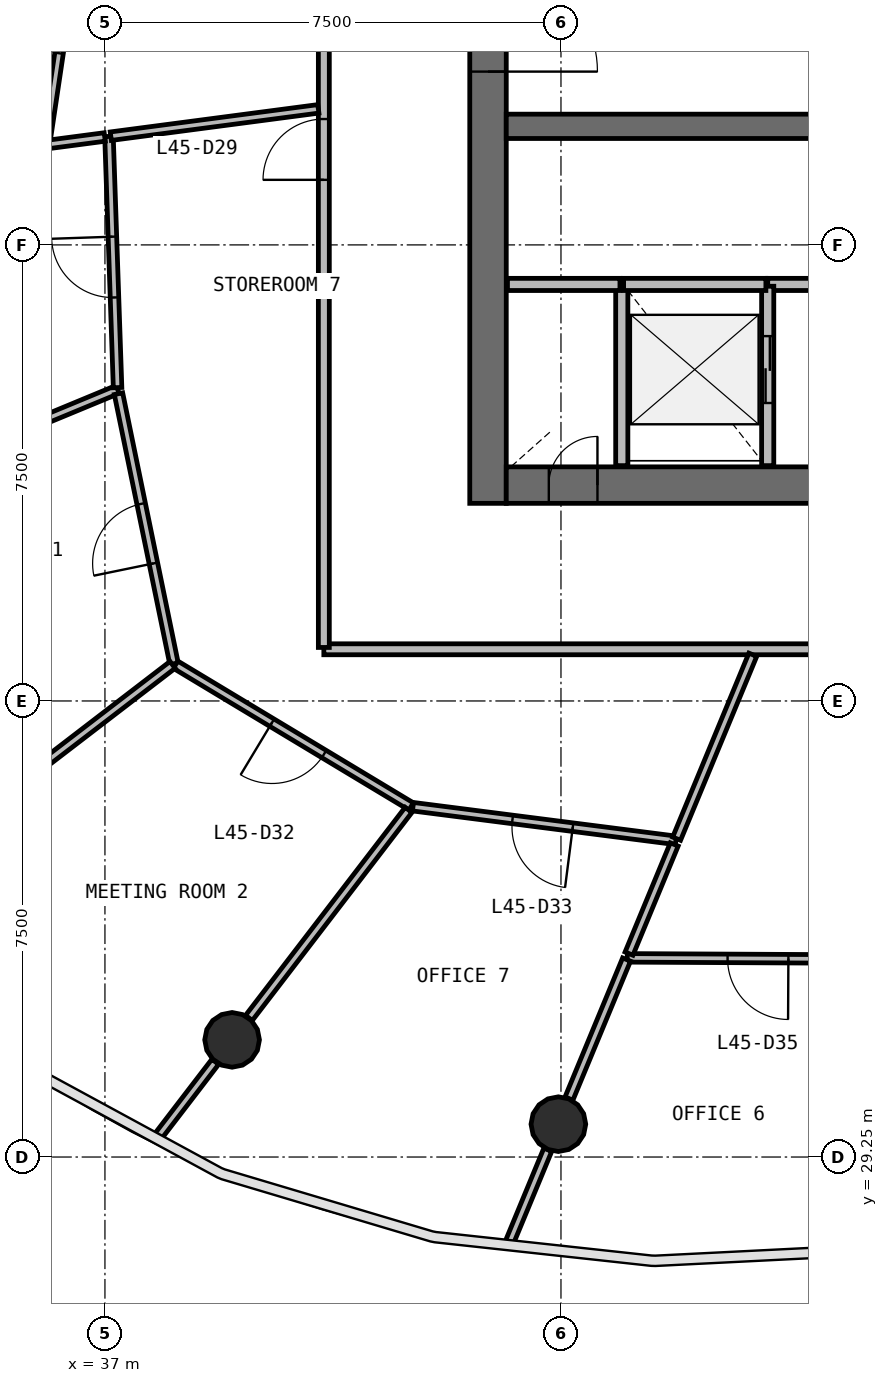
"""IFC4 building model, lengths in metres.
Left out: names, types, materials, properties, quantities, classifications, styles, units other than length and angle.
Written with IfcOpenShell. Run it as: python <this file> out.ifc"""

import sys

from ifc_helpers import new_model, si_unit, direction, frame, frame_2d, origin, origin_2d, place, context, subcontext, project, spatial, rectangle, circle, extrude, source, transform, mapped, element, fill, save


model = new_model("IFC4")
c1 = context("Model", 3, precision=1e-05, world=origin(), true_north=direction((0.0, 1.0)))
c2 = subcontext(c1, "Body", "Model", "MODEL_VIEW")
j1 = project(units=[si_unit("LENGTHUNIT", "METRE"), si_unit("PLANEANGLEUNIT", "RADIAN")], contexts=[c1])
p1 = place(None, origin())
s1 = spatial("IfcSite", under=j1, at=p1, CompositionType="ELEMENT")
p2 = place(p1, origin())
s2 = spatial("IfcBuilding", under=s1, at=p2, CompositionType="ELEMENT")
p3 = place(p2, frame((0.0, 0.0, 187.7)))
s3 = spatial("IfcBuildingStorey", under=s2, at=p3, CompositionType="ELEMENT", Elevation=187.7)
p4 = place(p3, frame((43.3, 56.0, 0.0), z_axis=(0.0, 0.0, 1.0), x_axis=(0.0, -1.0, 0.0)))
e1 = element("IfcWall", 1, at=p4, inside=s3, PredefinedType="SHEAR", context=c2, shape_type="SweptSolid", body=[
    extrude(rectangle(XDim=16.0, YDim=0.6, at=frame_2d((8.0, 0.0))), origin(), (0.0, 0.0, 1.0), 3.9),
])
p5 = place(p4, frame((7.1, 0.0, 0.0)))
e2 = element("IfcOpeningElement", 2, at=p5, cuts=e1, PredefinedType="OPENING", context=c2, shape_type="SweptSolid", body=[
    extrude(rectangle(XDim=1.8, YDim=2.1, at=frame_2d((0.9, 1.05))), frame((0.0, 0.31, 0.0), z_axis=(0.0, -1.0, 0.0), x_axis=(1.0, 0.0, 0.0)), (0.0, 0.0, 1.0), 0.62),
])
p6 = place(p3, frame((43.6, 40.3, 0.0), z_axis=(0.0, 0.0, 1.0), x_axis=(1.0, 0.0, 0.0)))
e3 = element("IfcWall", 3, at=p6, inside=s3, PredefinedType="SHEAR", context=c2, shape_type="SweptSolid", body=[
    extrude(rectangle(XDim=16.8, YDim=0.6, at=frame_2d((8.4, 0.0))), origin(), (0.0, 0.0, 1.0), 3.9),
])
p7 = place(p6, frame((10.3, 0.0, 0.0)))
e4 = element("IfcOpeningElement", 4, at=p7, cuts=e3, PredefinedType="OPENING", context=c2, shape_type="SweptSolid", body=[
    extrude(rectangle(XDim=1.2, YDim=2.1, at=frame_2d((0.6, 1.05))), frame((0.0, 0.31, 0.0), z_axis=(0.0, -1.0, 0.0), x_axis=(1.0, 0.0, 0.0)), (0.0, 0.0, 1.0), 0.62),
])
p8 = place(p6, frame((7.25, 0.0, 0.0)))
e5 = element("IfcOpeningElement", 5, at=p8, cuts=e3, PredefinedType="OPENING", context=c2, shape_type="SweptSolid", body=[
    extrude(rectangle(XDim=1.1, YDim=2.1, at=frame_2d((0.55, 1.05))), frame((0.0, 0.31, 0.0), z_axis=(0.0, -1.0, 0.0), x_axis=(1.0, 0.0, 0.0)), (0.0, 0.0, 1.0), 0.62),
])
p9 = place(p6, frame((0.7, 0.0, 0.0)))
e6 = element("IfcOpeningElement", 6, at=p9, cuts=e3, PredefinedType="OPENING", context=c2, shape_type="SweptSolid", body=[
    extrude(rectangle(XDim=0.8, YDim=2.1, at=frame_2d((0.4, 1.05))), frame((0.0, 0.31, 0.0), z_axis=(0.0, -1.0, 0.0), x_axis=(1.0, 0.0, 0.0)), (0.0, 0.0, 1.0), 0.62),
])
p10 = place(p3, frame((43.6, 46.2, 0.0), z_axis=(0.0, 0.0, 1.0), x_axis=(1.0, 0.0, 0.0)))
e7 = element("IfcWall", 7, at=p10, inside=s3, PredefinedType="SHEAR", context=c2, shape_type="SweptSolid", body=[
    extrude(rectangle(XDim=16.8, YDim=0.4, at=frame_2d((8.4, 0.0))), origin(), (0.0, 0.0, 1.0), 3.9),
])
p11 = place(p10, frame((9.8, 0.0, 0.0)))
e8 = element("IfcOpeningElement", 8, at=p11, cuts=e7, PredefinedType="OPENING", context=c2, shape_type="SweptSolid", body=[
    extrude(rectangle(XDim=1.1, YDim=2.1, at=frame_2d((0.55, 1.05))), frame((0.0, 0.21, 0.0), z_axis=(0.0, -1.0, 0.0), x_axis=(1.0, 0.0, 0.0)), (0.0, 0.0, 1.0), 0.42),
])
p12 = place(p10, frame((12.3, 0.0, 0.0)))
e9 = element("IfcOpeningElement", 9, at=p12, cuts=e7, PredefinedType="OPENING", context=c2, shape_type="SweptSolid", body=[
    extrude(rectangle(XDim=1.1, YDim=2.1, at=frame_2d((0.55, 1.05))), frame((0.0, 0.21, 0.0), z_axis=(0.0, -1.0, 0.0), x_axis=(1.0, 0.0, 0.0)), (0.0, 0.0, 1.0), 0.42),
])
p13 = place(p10, frame((14.8, 0.0, 0.0)))
e10 = element("IfcOpeningElement", 10, at=p13, cuts=e7, PredefinedType="OPENING", context=c2, shape_type="SweptSolid", body=[
    extrude(rectangle(XDim=1.1, YDim=2.1, at=frame_2d((0.55, 1.05))), frame((0.0, 0.21, 0.0), z_axis=(0.0, -1.0, 0.0), x_axis=(1.0, 0.0, 0.0)), (0.0, 0.0, 1.0), 0.42),
])
p14 = place(p10, frame((7.85, 0.0, 0.0)))
e11 = element("IfcOpeningElement", 11, at=p14, cuts=e7, PredefinedType="OPENING", context=c2, shape_type="SweptSolid", body=[
    extrude(rectangle(XDim=0.9, YDim=2.1, at=frame_2d((0.45, 1.05))), frame((0.0, 0.21, 0.0), z_axis=(0.0, -1.0, 0.0), x_axis=(1.0, 0.0, 0.0)), (0.0, 0.0, 1.0), 0.42),
])
m1 = source(origin(), c2, "Body", "SweptSolid", [
    extrude(circle(Radius=0.45, at=origin_2d()), origin(), (0.0, 0.0, 1.0), 3.9),
])
for number, where, z_axis, x_axis in (
    (12, (39.091, 31.177, 0.0), (0.0, 0.0, 1.0), (1.0, 0.0, 0.0)),
    (13, (44.457, 29.79, 0.0), (0.0, 0.0, 1.0), (1.0, 0.0, 0.0)),
):
    element("IfcColumn", number, at=place(p3, frame(where, z_axis=z_axis, x_axis=x_axis)), inside=s3, PredefinedType="COLUMN", context=c2, shape_type="MappedRepresentation", body=[
        mapped(m1, transform((0.0, 0.0, 0.0), scale=1.0)),
    ])
p15 = place(p3, frame((52.7, 43.6, 0.0), z_axis=(0.0, 0.0, 1.0), x_axis=(-1.0, 0.0, 0.0)))
e14 = element("IfcWall", 14, at=p15, inside=s3, PredefinedType="SOLIDWALL", context=c2, shape_type="SweptSolid", body=[
    extrude(rectangle(XDim=4.8, YDim=0.2, at=frame_2d((2.4, 0.0))), origin(), (0.0, 0.0, 1.0), 3.58),
])
p16 = place(p3, frame((45.5, 43.6, 0.0), z_axis=(0.0, 0.0, 1.0), x_axis=(0.0, -1.0, 0.0)))
e15 = element("IfcWall", 15, at=p16, inside=s3, PredefinedType="SOLIDWALL", context=c2, shape_type="SweptSolid", body=[
    extrude(rectangle(XDim=2.98, YDim=0.2, at=frame_2d((1.49, 0.0))), origin(), (0.0, 0.0, 1.0), 3.58),
])
p17 = place(p3, frame((47.9, 40.62, 0.0), z_axis=(0.0, 0.0, 1.0), x_axis=(0.0, 1.0, 0.0)))
e16 = element("IfcWall", 16, at=p17, inside=s3, PredefinedType="SOLIDWALL", context=c2, shape_type="SweptSolid", body=[
    extrude(rectangle(XDim=2.95, YDim=0.2, at=frame_2d((1.475, 0.0))), origin(), (0.0, 0.0, 1.0), 3.58),
])
p18 = place(p17, frame((1.03, 0.0, 0.0)))
e17 = element("IfcOpeningElement", 17, at=p18, cuts=e16, PredefinedType="OPENING", context=c2, shape_type="SweptSolid", body=[
    extrude(rectangle(XDim=1.1, YDim=2.1, at=frame_2d((0.55, 1.05))), frame((0.0, 0.11, 0.0), z_axis=(0.0, -1.0, 0.0), x_axis=(1.0, 0.0, 0.0)), (0.0, 0.0, 1.0), 0.22),
])
p19 = place(p3, frame((47.87, 43.6, 0.0), z_axis=(0.0, 0.0, 1.0), x_axis=(-1.0, 0.0, 0.0)))
e18 = element("IfcWall", 18, at=p19, inside=s3, PredefinedType="SOLIDWALL", context=c2, shape_type="SweptSolid", body=[
    extrude(rectangle(XDim=2.34, YDim=0.2, at=frame_2d((1.17, 0.0))), origin(), (0.0, 0.0, 1.0), 3.58),
])
p20 = place(p3, frame((45.47, 43.6, 0.0), z_axis=(0.0, 0.0, 1.0), x_axis=(-1.0, 0.0, 0.0)))
e19 = element("IfcWall", 19, at=p20, inside=s3, PredefinedType="SOLIDWALL", context=c2, shape_type="SweptSolid", body=[
    extrude(rectangle(XDim=1.85, YDim=0.2, at=frame_2d((0.925, 0.0))), origin(), (0.0, 0.0, 1.0), 3.58),
])
p21 = place(p3, frame((63.4, 37.6, 0.0), z_axis=(0.0, 0.0, 1.0), x_axis=(-1.0, 0.0, 0.0)))
e20 = element("IfcWall", 20, at=p21, inside=s3, PredefinedType="PARTITIONING", context=c2, shape_type="SweptSolid", body=[
    extrude(rectangle(XDim=22.8, YDim=0.18, at=frame_2d((11.4, 0.0))), origin(), (0.0, 0.0, 1.0), 2.88),
])
p22 = place(p21, frame((10.95, 0.0, 0.0)))
e21 = element("IfcOpeningElement", 21, at=p22, cuts=e20, PredefinedType="OPENING", context=c2, shape_type="SweptSolid", body=[
    extrude(rectangle(XDim=1.0, YDim=2.1, at=frame_2d((0.5, 1.05))), frame((0.0, 0.1, 0.0), z_axis=(0.0, -1.0, 0.0), x_axis=(1.0, 0.0, 0.0)), (0.0, 0.0, 1.0), 0.2),
])
p23 = place(p21, frame((8.75, 0.0, 0.0)))
e22 = element("IfcOpeningElement", 22, at=p23, cuts=e20, PredefinedType="OPENING", context=c2, shape_type="SweptSolid", body=[
    extrude(rectangle(XDim=1.0, YDim=2.1, at=frame_2d((0.5, 1.05))), frame((0.0, 0.1, 0.0), z_axis=(0.0, -1.0, 0.0), x_axis=(1.0, 0.0, 0.0)), (0.0, 0.0, 1.0), 0.2),
])
p24 = place(p21, frame((1.95, 0.0, 0.0)))
e23 = element("IfcOpeningElement", 23, at=p24, cuts=e20, PredefinedType="OPENING", context=c2, shape_type="SweptSolid", body=[
    extrude(rectangle(XDim=1.0, YDim=2.1, at=frame_2d((0.5, 1.05))), frame((0.0, 0.1, 0.0), z_axis=(0.0, -1.0, 0.0), x_axis=(1.0, 0.0, 0.0)), (0.0, 0.0, 1.0), 0.2),
])
p25 = place(p3, frame((40.6, 37.63, 0.0), z_axis=(0.0, 0.0, 1.0), x_axis=(0.0, 1.0, 0.0)))
e24 = element("IfcWall", 24, at=p25, inside=s3, PredefinedType="PARTITIONING", context=c2, shape_type="SweptSolid", body=[
    extrude(rectangle(XDim=20.74, YDim=0.18, at=frame_2d((10.37, 0.0))), origin(), (0.0, 0.0, 1.0), 2.88),
])
p26 = place(p25, frame((9.89, 0.0, 0.0)))
e25 = element("IfcOpeningElement", 25, at=p26, cuts=e24, PredefinedType="OPENING", context=c2, shape_type="SweptSolid", body=[
    extrude(rectangle(XDim=1.0, YDim=2.1, at=frame_2d((0.5, 1.05))), frame((0.0, 0.1, 0.0), z_axis=(0.0, -1.0, 0.0), x_axis=(1.0, 0.0, 0.0)), (0.0, 0.0, 1.0), 0.2),
])
p27 = place(p25, frame((7.69, 0.0, 0.0)))
e26 = element("IfcOpeningElement", 26, at=p27, cuts=e24, PredefinedType="OPENING", context=c2, shape_type="SweptSolid", body=[
    extrude(rectangle(XDim=1.0, YDim=2.1, at=frame_2d((0.5, 1.05))), frame((0.0, 0.1, 0.0), z_axis=(0.0, -1.0, 0.0), x_axis=(1.0, 0.0, 0.0)), (0.0, 0.0, 1.0), 0.2),
])
p28 = place(p3, frame((37.209, 41.873, 0.0), z_axis=(0.0, 0.0, 1.0), x_axis=(-0.923876934089, -0.38268970545, 0.0)))
e27 = element("IfcWall", 27, at=p28, inside=s3, PredefinedType="PARTITIONING", context=c2, shape_type="SweptSolid", body=[
    extrude(rectangle(XDim=5.998, YDim=0.14, at=frame_2d((2.999, 0.0))), origin(), (0.0, 0.0, 1.0), 2.88),
])
p29 = place(p3, frame((38.136, 37.362, 0.0), z_axis=(0.0, 0.0, 1.0), x_axis=(-0.201373374917, 0.979514555213, 0.0)))
e28 = element("IfcWall", 28, at=p29, inside=s3, PredefinedType="PARTITIONING", context=c2, shape_type="SweptSolid", body=[
    extrude(rectangle(XDim=4.534, YDim=0.14, at=frame_2d((2.267, 0.0))), origin(), (0.0, 0.0, 1.0), 2.88),
])
p30 = place(p29, frame((1.684, 0.0, 0.0)))
e29 = element("IfcOpeningElement", 29, at=p30, cuts=e28, PredefinedType="OPENING", context=c2, shape_type="SweptSolid", body=[
    extrude(rectangle(XDim=1.0, YDim=2.1, at=frame_2d((0.5, 1.05))), frame((0.0, 0.08, 0.0), z_axis=(0.0, -1.0, 0.0), x_axis=(1.0, 0.0, 0.0)), (0.0, 0.0, 1.0), 0.16),
])
p31 = place(p3, frame((42.036, 35.015, 0.0), z_axis=(0.0, 0.0, 1.0), x_axis=(-0.856772700272, 0.515694231176, 0.0)))
e30 = element("IfcWall", 30, at=p31, inside=s3, PredefinedType="PARTITIONING", context=c2, shape_type="SweptSolid", body=[
    extrude(rectangle(XDim=4.522, YDim=0.14, at=frame_2d((2.261, 0.0))), origin(), (0.0, 0.0, 1.0), 2.88),
])
p32 = place(p31, frame((1.672, 0.0, 0.0)))
e31 = element("IfcOpeningElement", 31, at=p32, cuts=e30, PredefinedType="OPENING", context=c2, shape_type="SweptSolid", body=[
    extrude(rectangle(XDim=1.0, YDim=2.1, at=frame_2d((0.5, 1.05))), frame((0.0, 0.08, 0.0), z_axis=(0.0, -1.0, 0.0), x_axis=(1.0, 0.0, 0.0)), (0.0, 0.0, 1.0), 0.16),
])
p33 = place(p3, frame((38.113, 37.344, 0.0), z_axis=(0.0, 0.0, 1.0), x_axis=(-0.793352786595, -0.608762150599, 0.0)))
e32 = element("IfcWall", 32, at=p33, inside=s3, PredefinedType="PARTITIONING", context=c2, shape_type="SweptSolid", body=[
    extrude(rectangle(XDim=4.48, YDim=0.14, at=frame_2d((2.24, 0.0))), origin(), (0.0, 0.0, 1.0), 2.88),
])
p34 = place(p3, frame((46.39, 34.458, 0.0), z_axis=(0.0, 0.0, 1.0), x_axis=(-0.991909170029, 0.126949590044, 0.0)))
e33 = element("IfcWall", 33, at=p34, inside=s3, PredefinedType="PARTITIONING", context=c2, shape_type="SweptSolid", body=[
    extrude(rectangle(XDim=4.36, YDim=0.14, at=frame_2d((2.18, 0.0))), origin(), (0.0, 0.0, 1.0), 2.88),
])
p35 = place(p34, frame((1.71, 0.0, 0.0)))
e34 = element("IfcOpeningElement", 34, at=p35, cuts=e33, PredefinedType="OPENING", context=c2, shape_type="SweptSolid", body=[
    extrude(rectangle(XDim=1.0, YDim=2.1, at=frame_2d((0.5, 1.05))), frame((0.0, 0.08, 0.0), z_axis=(0.0, -1.0, 0.0), x_axis=(1.0, 0.0, 0.0)), (0.0, 0.0, 1.0), 0.16),
])
p36 = place(p3, frame((41.993, 34.959, 0.0), z_axis=(0.0, 0.0, 1.0), x_axis=(-0.608785643194, -0.793334759506, 0.0)))
e35 = element("IfcWall", 35, at=p36, inside=s3, PredefinedType="PARTITIONING", context=c2, shape_type="SweptSolid", body=[
    extrude(rectangle(XDim=4.313, YDim=0.14, at=frame_2d((2.156, 0.0))), origin(), (0.0, 0.0, 1.0), 2.88),
])
p37 = place(p3, frame((49.96, 32.503, 0.0), z_axis=(0.0, 0.0, 1.0), x_axis=(-0.999986789233, 0.005140171226, 0.0)))
e36 = element("IfcWall", 36, at=p37, inside=s3, PredefinedType="PARTITIONING", context=c2, shape_type="SweptSolid", body=[
    extrude(rectangle(XDim=4.37, YDim=0.14, at=frame_2d((2.185, 0.0))), origin(), (0.0, 0.0, 1.0), 2.88),
])
p38 = place(p37, frame((1.72, 0.0, 0.0)))
e37 = element("IfcOpeningElement", 37, at=p38, cuts=e36, PredefinedType="OPENING", context=c2, shape_type="SweptSolid", body=[
    extrude(rectangle(XDim=1.0, YDim=2.1, at=frame_2d((0.5, 1.05))), frame((0.0, 0.08, 0.0), z_axis=(0.0, -1.0, 0.0), x_axis=(1.0, 0.0, 0.0)), (0.0, 0.0, 1.0), 0.16),
])
p39 = place(p3, frame((36.025, 45.926, 0.0), z_axis=(0.0, 0.0, 1.0), x_axis=(0.147524764939, 0.989058362145, 0.0)))
e38 = element("IfcWall", 38, at=p39, inside=s3, PredefinedType="PARTITIONING", context=c2, shape_type="SweptSolid", body=[
    extrude(rectangle(XDim=4.142, YDim=0.14, at=frame_2d((2.071, 0.0))), origin(), (0.0, 0.0, 1.0), 2.88),
])
p40 = place(p39, frame((1.492, 0.0, 0.0)))
e39 = element("IfcOpeningElement", 39, at=p40, cuts=e38, PredefinedType="OPENING", context=c2, shape_type="SweptSolid", body=[
    extrude(rectangle(XDim=1.0, YDim=2.1, at=frame_2d((0.5, 1.05))), frame((0.0, 0.08, 0.0), z_axis=(0.0, -1.0, 0.0), x_axis=(1.0, 0.0, 0.0)), (0.0, 0.0, 1.0), 0.16),
])
p41 = place(p3, frame((37.208, 41.903, 0.0), z_axis=(0.0, 0.0, 1.0), x_axis=(-0.034201859053, 0.999414945274, 0.0)))
e40 = element("IfcWall", 40, at=p41, inside=s3, PredefinedType="PARTITIONING", context=c2, shape_type="SweptSolid", body=[
    extrude(rectangle(XDim=4.133, YDim=0.14, at=frame_2d((2.066, 0.0))), origin(), (0.0, 0.0, 1.0), 2.88),
])
p42 = place(p41, frame((1.483, 0.0, 0.0)))
e41 = element("IfcOpeningElement", 41, at=p42, cuts=e40, PredefinedType="OPENING", context=c2, shape_type="SweptSolid", body=[
    extrude(rectangle(XDim=1.0, YDim=2.1, at=frame_2d((0.5, 1.05))), frame((0.0, 0.08, 0.0), z_axis=(0.0, -1.0, 0.0), x_axis=(1.0, 0.0, 0.0)), (0.0, 0.0, 1.0), 0.16),
])
p43 = place(p3, frame((40.51, 46.487, 0.0), z_axis=(0.0, 0.0, 1.0), x_axis=(-0.991443915104, -0.130533379654, 0.0)))
e42 = element("IfcWall", 42, at=p43, inside=s3, PredefinedType="PARTITIONING", context=c2, shape_type="SweptSolid", body=[
    extrude(rectangle(XDim=3.443, YDim=0.14, at=frame_2d((1.722, 0.0))), origin(), (0.0, 0.0, 1.0), 2.88),
])
p44 = place(p3, frame((47.655, 37.51, 0.0), z_axis=(0.0, 0.0, 1.0), x_axis=(-0.382613033564, -0.923908689507, 0.0)))
e43 = element("IfcWall", 43, at=p44, inside=s3, PredefinedType="PARTITIONING", context=c2, shape_type="SweptSolid", body=[
    extrude(rectangle(XDim=3.274, YDim=0.14, at=frame_2d((1.637, 0.0))), origin(), (0.0, 0.0, 1.0), 2.88),
])
p45 = place(p3, frame((45.579, 32.498, 0.0), z_axis=(0.0, 0.0, 1.0), x_axis=(-0.38268861501, -0.923877385773, 0.0)))
e44 = element("IfcWall", 44, at=p45, inside=s3, PredefinedType="PARTITIONING", context=c2, shape_type="SweptSolid", body=[
    extrude(rectangle(XDim=2.475, YDim=0.14, at=frame_2d((1.238, 0.0))), origin(), (0.0, 0.0, 1.0), 2.88),
])
p46 = place(p3, frame((46.363, 34.39, 0.0), z_axis=(0.0, 0.0, 1.0), x_axis=(-0.382714283838, -0.923866752809, 0.0)))
e45 = element("IfcWall", 45, at=p46, inside=s3, PredefinedType="PARTITIONING", context=c2, shape_type="SweptSolid", body=[
    extrude(rectangle(XDim=1.943, YDim=0.14, at=frame_2d((0.972, 0.0))), origin(), (0.0, 0.0, 1.0), 2.88),
])
p47 = place(p3, frame((44.283, 29.37, 0.0), z_axis=(0.0, 0.0, 1.0), x_axis=(-0.382707947272, -0.923869377723, 0.0)))
e46 = element("IfcWall", 46, at=p47, inside=s3, PredefinedType="PARTITIONING", context=c2, shape_type="SweptSolid", body=[
    extrude(rectangle(XDim=1.655, YDim=0.14, at=frame_2d((0.827, 0.0))), origin(), (0.0, 0.0, 1.0), 2.88),
])
p48 = place(p3, frame((38.814, 30.816, 0.0), z_axis=(0.0, 0.0, 1.0), x_axis=(-0.608679829307, -0.793415947278, 0.0)))
e47 = element("IfcWall", 47, at=p48, inside=s3, PredefinedType="PARTITIONING", context=c2, shape_type="SweptSolid", body=[
    extrude(rectangle(XDim=1.569, YDim=0.14, at=frame_2d((0.784, 0.0))), origin(), (0.0, 0.0, 1.0), 2.88),
])
p49 = place(p3, frame((36.997, 46.025, 0.0), z_axis=(0.0, 0.0, 1.0), x_axis=(-0.991425548732, -0.130672802528, 0.0)))
e48 = element("IfcWall", 48, at=p49, inside=s3, PredefinedType="PARTITIONING", context=c2, shape_type="SweptSolid", body=[
    extrude(rectangle(XDim=0.955, YDim=0.14, at=frame_2d((0.478, 0.0))), origin(), (0.0, 0.0, 1.0), 2.88),
])
m2 = source(origin(), c2, "Body", "SweptSolid", [
    extrude(rectangle(XDim=1.8, YDim=2.1, at=frame_2d((0.9, 1.05))), frame((0.0, 0.025, 0.0), z_axis=(0.0, -1.0, 0.0), x_axis=(1.0, 0.0, 0.0)), (0.0, 0.0, 1.0), 0.05),
])
p50 = place(p5, origin())
e49 = element("IfcDoor", 49, at=p50, inside=s3, OperationType="SINGLE_SWING_RIGHT", PredefinedType="DOOR", context=c2, shape_type="MappedRepresentation", body=[
    mapped(m2, transform((0.0, 0.0, 0.0), scale=1.0)),
])
fill(e2, e49)
m3 = source(origin(), c2, "Body", "SweptSolid", [
    extrude(rectangle(XDim=1.1, YDim=2.1, at=frame_2d((0.55, 1.05))), frame((0.0, 0.025, 0.0), z_axis=(0.0, -1.0, 0.0), x_axis=(1.0, 0.0, 0.0)), (0.0, 0.0, 1.0), 0.05),
])
p51 = place(p18, origin())
e50 = element("IfcDoor", 50, at=p51, inside=s3, OperationType="DOUBLE_DOOR_SLIDING", PredefinedType="USERDEFINED", context=c2, shape_type="MappedRepresentation", body=[
    mapped(m3, transform((0.0, 0.0, 0.0), scale=1.0)),
])
fill(e17, e50)
m4 = source(origin(), c2, "Body", "SweptSolid", [
    extrude(rectangle(XDim=0.8, YDim=2.1, at=frame_2d((0.4, 1.05))), frame((0.0, 0.025, 0.0), z_axis=(0.0, -1.0, 0.0), x_axis=(1.0, 0.0, 0.0)), (0.0, 0.0, 1.0), 0.05),
])
p52 = place(p9, origin())
e51 = element("IfcDoor", 51, at=p52, inside=s3, OperationType="SINGLE_SWING_RIGHT", PredefinedType="DOOR", context=c2, shape_type="MappedRepresentation", body=[
    mapped(m4, transform((0.0, 0.0, 0.0), scale=1.0)),
])
fill(e6, e51)
m5 = source(origin(), c2, "Body", "SweptSolid", [
    extrude(rectangle(XDim=1.0, YDim=2.1, at=frame_2d((0.5, 1.05))), frame((0.0, 0.025, 0.0), z_axis=(0.0, -1.0, 0.0), x_axis=(1.0, 0.0, 0.0)), (0.0, 0.0, 1.0), 0.05),
])
p53 = place(p40, origin())
e52 = element("IfcDoor", 52, at=p53, inside=s3, OperationType="SINGLE_SWING_RIGHT", PredefinedType="DOOR", context=c2, shape_type="MappedRepresentation", body=[
    mapped(m5, transform((0.0, 0.0, 0.0), scale=1.0)),
])
fill(e39, e52)
p54 = place(p27, origin())
e53 = element("IfcDoor", 53, at=p54, inside=s3, OperationType="SINGLE_SWING_LEFT", PredefinedType="DOOR", context=c2, shape_type="MappedRepresentation", body=[
    mapped(m5, transform((0.0, 0.0, 0.0), scale=1.0)),
])
fill(e26, e53)
p55 = place(p42, origin())
e54 = element("IfcDoor", 54, at=p55, inside=s3, OperationType="SINGLE_SWING_RIGHT", PredefinedType="DOOR", context=c2, shape_type="MappedRepresentation", body=[
    mapped(m5, transform((0.0, 0.0, 0.0), scale=1.0)),
])
fill(e41, e54)
p56 = place(p30, origin())
e55 = element("IfcDoor", 55, at=p56, inside=s3, OperationType="SINGLE_SWING_LEFT", PredefinedType="DOOR", context=c2, shape_type="MappedRepresentation", body=[
    mapped(m5, transform((0.0, 0.0, 0.0), scale=1.0)),
])
fill(e29, e55)
p57 = place(p32, origin())
e56 = element("IfcDoor", 56, at=p57, inside=s3, OperationType="SINGLE_SWING_RIGHT", PredefinedType="DOOR", context=c2, shape_type="MappedRepresentation", body=[
    mapped(m5, transform((0.0, 0.0, 0.0), scale=1.0)),
])
fill(e31, e56)
p58 = place(p35, origin())
e57 = element("IfcDoor", 57, at=p58, inside=s3, OperationType="SINGLE_SWING_LEFT", PredefinedType="DOOR", context=c2, shape_type="MappedRepresentation", body=[
    mapped(m5, transform((0.0, 0.0, 0.0), scale=1.0)),
])
fill(e34, e57)
p59 = place(p38, origin())
e58 = element("IfcDoor", 58, at=p59, inside=s3, OperationType="SINGLE_SWING_LEFT", PredefinedType="DOOR", context=c2, shape_type="MappedRepresentation", body=[
    mapped(m5, transform((0.0, 0.0, 0.0), scale=1.0)),
])
fill(e37, e58)
save(model, sys.argv[1])
